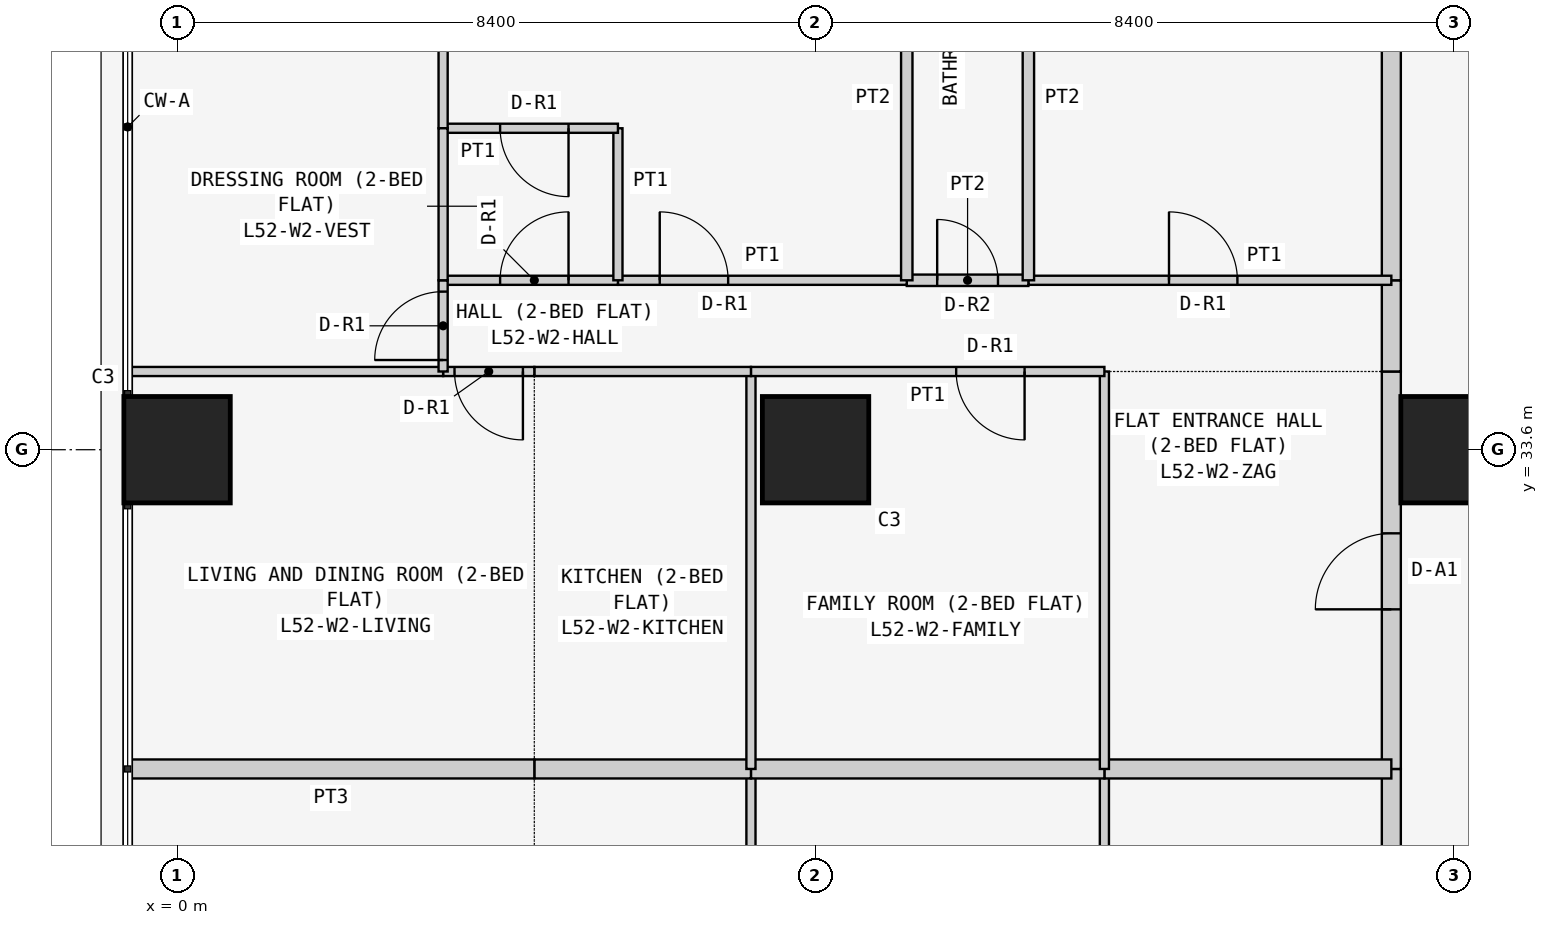
"""IFC4 building model, lengths in metres.
Left out: names, types, materials, properties, quantities, classifications, styles, units other than length and angle.
Written with IfcOpenShell. Run it as: python <this file> out.ifc"""

import sys

from ifc_helpers import new_model, si_unit, direction, frame, frame_2d, origin, origin_2d, place, context, subcontext, project, spatial, rectangle, extrude, element, fill, save


model = new_model("IFC4")
c1 = context("Model", 3, precision=1e-05, world=origin(), true_north=direction((0.0, 1.0)))
c2 = subcontext(c1, "Body", "Model", "MODEL_VIEW")
j1 = project(units=[si_unit("LENGTHUNIT", "METRE"), si_unit("PLANEANGLEUNIT", "RADIAN")], contexts=[c1])
p1 = place(None, origin())
s1 = spatial("IfcSite", under=j1, at=p1, CompositionType="ELEMENT")
p2 = place(p1, origin())
s2 = spatial("IfcBuilding", under=s1, at=p2, CompositionType="ELEMENT")
p3 = place(p2, frame((0.0, 0.0, 201.3)))
s3 = spatial("IfcBuildingStorey", under=s2, at=p3, CompositionType="ELEMENT", Elevation=201.3)
for number, where, z_axis, x_axis in (
    (1, (0.0, 33.6, 0.0), (0.0, 0.0, 1.0), (1.0, 0.0, 0.0)),
    (2, (8.4, 33.6, 0.0), (0.0, 0.0, 1.0), (1.0, 0.0, 0.0)),
    (3, (16.8, 33.6, 0.0), (0.0, 0.0, 1.0), (1.0, 0.0, 0.0)),
):
    element("IfcColumn", number, at=place(p3, frame(where, z_axis=z_axis, x_axis=x_axis)), inside=s3, PredefinedType="COLUMN", context=c2, shape_type="SweptSolid", body=[
        extrude(rectangle(XDim=1.4, YDim=1.4, at=origin_2d()), origin(), (0.0, 0.0, 1.0), 3.6),
    ])
p4 = place(p3, frame((15.975, 24.171, 0.0), z_axis=(0.0, 0.0, 1.0), x_axis=(0.0, 1.0, 0.0)))
e4 = element("IfcWall", 4, at=p4, inside=s3, PredefinedType="PARTITIONING", context=c2, shape_type="SweptSolid", body=[
    extrude(rectangle(XDim=5.229, YDim=0.25, at=frame_2d((2.615, 0.0))), origin(), (0.0, 0.0, 1.0), 3.45),
])
p5 = place(p4, frame((2.129, 0.0, 0.0)))
e5 = element("IfcOpeningElement", 5, at=p5, cuts=e4, PredefinedType="OPENING", context=c2, shape_type="SweptSolid", body=[
    extrude(rectangle(XDim=1.0, YDim=2.1, at=frame_2d((0.5, 1.05))), frame((0.0, 0.135, 0.0), z_axis=(0.0, -1.0, 0.0), x_axis=(1.0, 0.0, 0.0)), (0.0, 0.0, 1.0), 0.27),
])
p6 = place(p3, frame((15.975, 29.4, 0.0), z_axis=(0.0, 0.0, 1.0), x_axis=(0.0, 1.0, 0.0)))
e6 = element("IfcWall", 6, at=p6, inside=s3, PredefinedType="PARTITIONING", context=c2, shape_type="SweptSolid", body=[
    extrude(rectangle(XDim=5.229, YDim=0.25, at=frame_2d((2.615, 0.0))), origin(), (0.0, 0.0, 1.0), 3.45),
])
p7 = place(p6, frame((2.1, 0.0, 0.0)))
e7 = element("IfcOpeningElement", 7, at=p7, cuts=e6, PredefinedType="OPENING", context=c2, shape_type="SweptSolid", body=[
    extrude(rectangle(XDim=1.0, YDim=2.1, at=frame_2d((0.5, 1.05))), frame((0.0, 0.135, 0.0), z_axis=(0.0, -1.0, 0.0), x_axis=(1.0, 0.0, 0.0)), (0.0, 0.0, 1.0), 0.27),
])
p8 = place(p3, frame((15.975, 34.629, 0.0), z_axis=(0.0, 0.0, 1.0), x_axis=(0.0, 1.0, 0.0)))
e8 = element("IfcWall", 8, at=p8, inside=s3, PredefinedType="PARTITIONING", context=c2, shape_type="SweptSolid", body=[
    extrude(rectangle(XDim=1.2, YDim=0.25, at=frame_2d((0.6, 0.0))), origin(), (0.0, 0.0, 1.0), 3.45),
])
p9 = place(p3, frame((15.975, 35.829, 0.0), z_axis=(0.0, 0.0, 1.0), x_axis=(0.0, 1.0, 0.0)))
e9 = element("IfcWall", 9, at=p9, inside=s3, PredefinedType="PARTITIONING", context=c2, shape_type="SweptSolid", body=[
    extrude(rectangle(XDim=6.871, YDim=0.25, at=frame_2d((3.436, 0.0))), origin(), (0.0, 0.0, 1.0), 3.45),
])
p10 = place(p3, frame((12.2, 29.4, 0.0), z_axis=(0.0, 0.0, 1.0), x_axis=(0.0, -1.0, 0.0)))
e10 = element("IfcWall", 10, at=p10, inside=s3, PredefinedType="PARTITIONING", context=c2, shape_type="SweptSolid", body=[
    extrude(rectangle(XDim=5.229, YDim=0.12, at=frame_2d((2.615, 0.0))), origin(), (0.0, 0.0, 1.0), 3.45),
])
p11 = place(p3, frame((15.975, 29.4, 0.0), z_axis=(0.0, 0.0, 1.0), x_axis=(-1.0, 0.0, 0.0)))
e11 = element("IfcWall", 11, at=p11, inside=s3, PredefinedType="PARTITIONING", context=c2, shape_type="SweptSolid", body=[
    extrude(rectangle(XDim=3.775, YDim=0.25, at=frame_2d((1.888, 0.0))), origin(), (0.0, 0.0, 1.0), 3.45),
])
p12 = place(p3, frame((7.55, 29.4, 0.0), z_axis=(0.0, 0.0, 1.0), x_axis=(0.0, -1.0, 0.0)))
e12 = element("IfcWall", 12, at=p12, inside=s3, PredefinedType="PARTITIONING", context=c2, shape_type="SweptSolid", body=[
    extrude(rectangle(XDim=5.229, YDim=0.12, at=frame_2d((2.615, 0.0))), origin(), (0.0, 0.0, 1.0), 3.45),
])
p13 = place(p3, frame((12.2, 29.4, 0.0), z_axis=(0.0, 0.0, 1.0), x_axis=(-1.0, 0.0, 0.0)))
e13 = element("IfcWall", 13, at=p13, inside=s3, PredefinedType="PARTITIONING", context=c2, shape_type="SweptSolid", body=[
    extrude(rectangle(XDim=4.65, YDim=0.25, at=frame_2d((2.325, 0.0))), origin(), (0.0, 0.0, 1.0), 3.45),
])
p14 = place(p3, frame((7.55, 29.4, 0.0), z_axis=(0.0, 0.0, 1.0), x_axis=(-1.0, 0.0, 0.0)))
e14 = element("IfcWall", 14, at=p14, inside=s3, PredefinedType="PARTITIONING", context=c2, shape_type="SweptSolid", body=[
    extrude(rectangle(XDim=2.85, YDim=0.25, at=frame_2d((1.425, 0.0))), origin(), (0.0, 0.0, 1.0), 3.45),
])
p15 = place(p3, frame((4.7, 29.4, 0.0), z_axis=(0.0, 0.0, 1.0), x_axis=(-1.0, 0.0, 0.0)))
e15 = element("IfcWall", 15, at=p15, inside=s3, PredefinedType="PARTITIONING", context=c2, shape_type="SweptSolid", body=[
    extrude(rectangle(XDim=5.35, YDim=0.25, at=frame_2d((2.675, 0.0))), origin(), (0.0, 0.0, 1.0), 3.45),
])
for number, where, z_axis, x_axis in (
    (16, (12.2, 29.4, 0.0), (0.0, 0.0, 1.0), (0.0, 1.0, 0.0)),
    (17, (7.55, 29.4, 0.0), (0.0, 0.0, 1.0), (0.0, 1.0, 0.0)),
):
    element("IfcWall", number, at=place(p3, frame(where, z_axis=z_axis, x_axis=x_axis)), inside=s3, PredefinedType="PARTITIONING", context=c2, shape_type="SweptSolid", body=[
        extrude(rectangle(XDim=5.229, YDim=0.12, at=frame_2d((2.615, 0.0))), origin(), (0.0, 0.0, 1.0), 3.45),
    ])
p16 = place(p3, frame((7.55, 34.629, 0.0), z_axis=(0.0, 0.0, 1.0), x_axis=(1.0, 0.0, 0.0)))
e18 = element("IfcWall", 18, at=p16, inside=s3, PredefinedType="PARTITIONING", context=c2, shape_type="SweptSolid", body=[
    extrude(rectangle(XDim=4.65, YDim=0.12, at=frame_2d((2.325, 0.0))), origin(), (0.0, 0.0, 1.0), 3.45),
])
p17 = place(p16, frame((2.7, 0.0, 0.0)))
e19 = element("IfcOpeningElement", 19, at=p17, cuts=e18, PredefinedType="OPENING", context=c2, shape_type="SweptSolid", body=[
    extrude(rectangle(XDim=0.9, YDim=2.1, at=frame_2d((0.45, 1.05))), frame((0.0, 0.07, 0.0), z_axis=(0.0, -1.0, 0.0), x_axis=(1.0, 0.0, 0.0)), (0.0, 0.0, 1.0), 0.14),
])
p18 = place(p3, frame((4.7, 34.629, 0.0), z_axis=(0.0, 0.0, 1.0), x_axis=(1.0, 0.0, 0.0)))
e20 = element("IfcWall", 20, at=p18, inside=s3, PredefinedType="PARTITIONING", context=c2, shape_type="SweptSolid", body=[
    extrude(rectangle(XDim=2.85, YDim=0.12, at=frame_2d((1.425, 0.0))), origin(), (0.0, 0.0, 1.0), 3.45),
])
p19 = place(p3, frame((3.5, 34.629, 0.0), z_axis=(0.0, 0.0, 1.0), x_axis=(1.0, 0.0, 0.0)))
e21 = element("IfcWall", 21, at=p19, inside=s3, PredefinedType="PARTITIONING", context=c2, shape_type="SweptSolid", body=[
    extrude(rectangle(XDim=1.2, YDim=0.12, at=frame_2d((0.6, 0.0))), origin(), (0.0, 0.0, 1.0), 3.45),
])
p20 = place(p19, frame((0.15, 0.0, 0.0)))
e22 = element("IfcOpeningElement", 22, at=p20, cuts=e21, PredefinedType="OPENING", context=c2, shape_type="SweptSolid", body=[
    extrude(rectangle(XDim=0.9, YDim=2.1, at=frame_2d((0.45, 1.05))), frame((0.0, 0.07, 0.0), z_axis=(0.0, -1.0, 0.0), x_axis=(1.0, 0.0, 0.0)), (0.0, 0.0, 1.0), 0.14),
])
p21 = place(p3, frame((-0.65, 34.629, 0.0), z_axis=(0.0, 0.0, 1.0), x_axis=(1.0, 0.0, 0.0)))
e23 = element("IfcWall", 23, at=p21, inside=s3, PredefinedType="PARTITIONING", context=c2, shape_type="SweptSolid", body=[
    extrude(rectangle(XDim=4.15, YDim=0.12, at=frame_2d((2.075, 0.0))), origin(), (0.0, 0.0, 1.0), 3.45),
])
p22 = place(p3, frame((11.2, 35.829, 0.0), z_axis=(0.0, 0.0, 1.0), x_axis=(1.0, 0.0, 0.0)))
e24 = element("IfcWall", 24, at=p22, inside=s3, PredefinedType="PARTITIONING", context=c2, shape_type="SweptSolid", body=[
    extrude(rectangle(XDim=4.775, YDim=0.12, at=frame_2d((2.388, 0.0))), origin(), (0.0, 0.0, 1.0), 3.45),
])
p23 = place(p22, frame((1.85, 0.0, 0.0)))
e25 = element("IfcOpeningElement", 25, at=p23, cuts=e24, PredefinedType="OPENING", context=c2, shape_type="SweptSolid", body=[
    extrude(rectangle(XDim=0.9, YDim=2.1, at=frame_2d((0.45, 1.05))), frame((0.0, 0.07, 0.0), z_axis=(0.0, -1.0, 0.0), x_axis=(1.0, 0.0, 0.0)), (0.0, 0.0, 1.0), 0.14),
])
p24 = place(p3, frame((9.6, 35.829, 0.0), z_axis=(0.0, 0.0, 1.0), x_axis=(1.0, 0.0, 0.0)))
e26 = element("IfcWall", 26, at=p24, inside=s3, PredefinedType="PARTITIONING", context=c2, shape_type="SweptSolid", body=[
    extrude(rectangle(XDim=1.6, YDim=0.15, at=frame_2d((0.8, 0.0))), origin(), (0.0, 0.0, 1.0), 3.45),
])
p25 = place(p24, frame((0.4, 0.0, 0.0)))
e27 = element("IfcOpeningElement", 27, at=p25, cuts=e26, PredefinedType="OPENING", context=c2, shape_type="SweptSolid", body=[
    extrude(rectangle(XDim=0.8, YDim=2.1, at=frame_2d((0.4, 1.05))), frame((0.0, 0.085, 0.0), z_axis=(0.0, -1.0, 0.0), x_axis=(1.0, 0.0, 0.0)), (0.0, 0.0, 1.0), 0.17),
])
p26 = place(p3, frame((5.8, 35.829, 0.0), z_axis=(0.0, 0.0, 1.0), x_axis=(1.0, 0.0, 0.0)))
e28 = element("IfcWall", 28, at=p26, inside=s3, PredefinedType="PARTITIONING", context=c2, shape_type="SweptSolid", body=[
    extrude(rectangle(XDim=3.8, YDim=0.12, at=frame_2d((1.9, 0.0))), origin(), (0.0, 0.0, 1.0), 3.45),
])
p27 = place(p26, frame((0.55, 0.0, 0.0)))
e29 = element("IfcOpeningElement", 29, at=p27, cuts=e28, PredefinedType="OPENING", context=c2, shape_type="SweptSolid", body=[
    extrude(rectangle(XDim=0.9, YDim=2.1, at=frame_2d((0.45, 1.05))), frame((0.0, 0.07, 0.0), z_axis=(0.0, -1.0, 0.0), x_axis=(1.0, 0.0, 0.0)), (0.0, 0.0, 1.0), 0.14),
])
p28 = place(p3, frame((3.5, 35.829, 0.0), z_axis=(0.0, 0.0, 1.0), x_axis=(1.0, 0.0, 0.0)))
e30 = element("IfcWall", 30, at=p28, inside=s3, PredefinedType="PARTITIONING", context=c2, shape_type="SweptSolid", body=[
    extrude(rectangle(XDim=2.3, YDim=0.12, at=frame_2d((1.15, 0.0))), origin(), (0.0, 0.0, 1.0), 3.45),
])
p29 = place(p28, frame((0.75, 0.0, 0.0)))
e31 = element("IfcOpeningElement", 31, at=p29, cuts=e30, PredefinedType="OPENING", context=c2, shape_type="SweptSolid", body=[
    extrude(rectangle(XDim=0.9, YDim=2.1, at=frame_2d((0.45, 1.05))), frame((0.0, 0.07, 0.0), z_axis=(0.0, -1.0, 0.0), x_axis=(1.0, 0.0, 0.0)), (0.0, 0.0, 1.0), 0.14),
])
p30 = place(p3, frame((3.5, 34.629, 0.0), z_axis=(0.0, 0.0, 1.0), x_axis=(0.0, 1.0, 0.0)))
e32 = element("IfcWall", 32, at=p30, inside=s3, PredefinedType="PARTITIONING", context=c2, shape_type="SweptSolid", body=[
    extrude(rectangle(XDim=1.2, YDim=0.12, at=frame_2d((0.6, 0.0))), origin(), (0.0, 0.0, 1.0), 3.45),
])
p31 = place(p30, frame((0.151, 0.0, 0.0)))
e33 = element("IfcOpeningElement", 33, at=p31, cuts=e32, PredefinedType="OPENING", context=c2, shape_type="SweptSolid", body=[
    extrude(rectangle(XDim=0.9, YDim=2.1, at=frame_2d((0.45, 1.05))), frame((0.0, 0.07, 0.0), z_axis=(0.0, -1.0, 0.0), x_axis=(1.0, 0.0, 0.0)), (0.0, 0.0, 1.0), 0.14),
])
for number, where, z_axis, x_axis in (
    (34, (11.2, 35.829, 0.0), (0.0, 0.0, 1.0), (0.0, 1.0, 0.0)),
    (35, (9.6, 35.829, 0.0), (0.0, 0.0, 1.0), (0.0, 1.0, 0.0)),
):
    element("IfcWall", number, at=place(p3, frame(where, z_axis=z_axis, x_axis=x_axis)), inside=s3, PredefinedType="PARTITIONING", context=c2, shape_type="SweptSolid", body=[
        extrude(rectangle(XDim=6.871, YDim=0.15, at=frame_2d((3.436, 0.0))), origin(), (0.0, 0.0, 1.0), 3.45),
    ])
p32 = place(p3, frame((5.8, 35.829, 0.0), z_axis=(0.0, 0.0, 1.0), x_axis=(0.0, 1.0, 0.0)))
e36 = element("IfcWall", 36, at=p32, inside=s3, PredefinedType="PARTITIONING", context=c2, shape_type="SweptSolid", body=[
    extrude(rectangle(XDim=2.0, YDim=0.12, at=frame_2d((1.0, 0.0))), origin(), (0.0, 0.0, 1.0), 3.45),
])
p33 = place(p3, frame((5.8, 37.829, 0.0), z_axis=(0.0, 0.0, 1.0), x_axis=(-1.0, 0.0, 0.0)))
e37 = element("IfcWall", 37, at=p33, inside=s3, PredefinedType="PARTITIONING", context=c2, shape_type="SweptSolid", body=[
    extrude(rectangle(XDim=2.3, YDim=0.12, at=frame_2d((1.15, 0.0))), origin(), (0.0, 0.0, 1.0), 3.45),
])
p34 = place(p33, frame((0.65, 0.0, 0.0)))
e38 = element("IfcOpeningElement", 38, at=p34, cuts=e37, PredefinedType="OPENING", context=c2, shape_type="SweptSolid", body=[
    extrude(rectangle(XDim=0.9, YDim=2.1, at=frame_2d((0.45, 1.05))), frame((0.0, 0.07, 0.0), z_axis=(0.0, -1.0, 0.0), x_axis=(1.0, 0.0, 0.0)), (0.0, 0.0, 1.0), 0.14),
])
p35 = place(p3, frame((3.5, 37.829, 0.0), z_axis=(0.0, 0.0, 1.0), x_axis=(0.0, 1.0, 0.0)))
e39 = element("IfcWall", 39, at=p35, inside=s3, PredefinedType="PARTITIONING", context=c2, shape_type="SweptSolid", body=[
    extrude(rectangle(XDim=4.871, YDim=0.12, at=frame_2d((2.436, 0.0))), origin(), (0.0, 0.0, 1.0), 3.45),
])
p36 = place(p3, frame((3.5, 35.829, 0.0), z_axis=(0.0, 0.0, 1.0), x_axis=(0.0, 1.0, 0.0)))
e40 = element("IfcWall", 40, at=p36, inside=s3, PredefinedType="PARTITIONING", context=c2, shape_type="SweptSolid", body=[
    extrude(rectangle(XDim=2.0, YDim=0.12, at=frame_2d((1.0, 0.0))), origin(), (0.0, 0.0, 1.0), 3.45),
])
p37 = place(p7, origin())
e41 = element("IfcDoor", 41, at=p37, inside=s3, OperationType="SINGLE_SWING_LEFT", PredefinedType="DOOR", context=c2, shape_type="SweptSolid", body=[
    extrude(rectangle(XDim=1.0, YDim=2.1, at=frame_2d((0.5, 1.05))), frame((0.0, 0.025, 0.0), z_axis=(0.0, -1.0, 0.0), x_axis=(1.0, 0.0, 0.0)), (0.0, 0.0, 1.0), 0.05),
])
fill(e7, e41)
p38 = place(p17, frame((0.9, 0.0, 0.0), z_axis=(0.0, 0.0, 1.0), x_axis=(-1.0, 0.0, 0.0)))
e42 = element("IfcDoor", 42, at=p38, inside=s3, OperationType="SINGLE_SWING_LEFT", PredefinedType="DOOR", context=c2, shape_type="SweptSolid", body=[
    extrude(rectangle(XDim=0.9, YDim=2.1, at=frame_2d((0.45, 1.05))), frame((0.0, 0.025, 0.0), z_axis=(0.0, -1.0, 0.0), x_axis=(1.0, 0.0, 0.0)), (0.0, 0.0, 1.0), 0.05),
])
fill(e19, e42)
p39 = place(p20, frame((0.9, 0.0, 0.0), z_axis=(0.0, 0.0, 1.0), x_axis=(-1.0, 0.0, 0.0)))
e43 = element("IfcDoor", 43, at=p39, inside=s3, OperationType="SINGLE_SWING_LEFT", PredefinedType="DOOR", context=c2, shape_type="SweptSolid", body=[
    extrude(rectangle(XDim=0.9, YDim=2.1, at=frame_2d((0.45, 1.05))), frame((0.0, 0.025, 0.0), z_axis=(0.0, -1.0, 0.0), x_axis=(1.0, 0.0, 0.0)), (0.0, 0.0, 1.0), 0.05),
])
fill(e22, e43)
p40 = place(p23, origin())
e44 = element("IfcDoor", 44, at=p40, inside=s3, OperationType="SINGLE_SWING_LEFT", PredefinedType="DOOR", context=c2, shape_type="SweptSolid", body=[
    extrude(rectangle(XDim=0.9, YDim=2.1, at=frame_2d((0.45, 1.05))), frame((0.0, 0.025, 0.0), z_axis=(0.0, -1.0, 0.0), x_axis=(1.0, 0.0, 0.0)), (0.0, 0.0, 1.0), 0.05),
])
fill(e25, e44)
p41 = place(p25, origin())
e45 = element("IfcDoor", 45, at=p41, inside=s3, OperationType="SINGLE_SWING_LEFT", PredefinedType="DOOR", context=c2, shape_type="SweptSolid", body=[
    extrude(rectangle(XDim=0.8, YDim=2.1, at=frame_2d((0.4, 1.05))), frame((0.0, 0.025, 0.0), z_axis=(0.0, -1.0, 0.0), x_axis=(1.0, 0.0, 0.0)), (0.0, 0.0, 1.0), 0.05),
])
fill(e27, e45)
p42 = place(p27, origin())
e46 = element("IfcDoor", 46, at=p42, inside=s3, OperationType="SINGLE_SWING_LEFT", PredefinedType="DOOR", context=c2, shape_type="SweptSolid", body=[
    extrude(rectangle(XDim=0.9, YDim=2.1, at=frame_2d((0.45, 1.05))), frame((0.0, 0.025, 0.0), z_axis=(0.0, -1.0, 0.0), x_axis=(1.0, 0.0, 0.0)), (0.0, 0.0, 1.0), 0.05),
])
fill(e29, e46)
p43 = place(p29, origin())
e47 = element("IfcDoor", 47, at=p43, inside=s3, OperationType="SINGLE_SWING_RIGHT", PredefinedType="DOOR", context=c2, shape_type="SweptSolid", body=[
    extrude(rectangle(XDim=0.9, YDim=2.1, at=frame_2d((0.45, 1.05))), frame((0.0, 0.025, 0.0), z_axis=(0.0, -1.0, 0.0), x_axis=(1.0, 0.0, 0.0)), (0.0, 0.0, 1.0), 0.05),
])
fill(e31, e47)
p44 = place(p34, origin())
e48 = element("IfcDoor", 48, at=p44, inside=s3, OperationType="SINGLE_SWING_LEFT", PredefinedType="DOOR", context=c2, shape_type="SweptSolid", body=[
    extrude(rectangle(XDim=0.9, YDim=2.1, at=frame_2d((0.45, 1.05))), frame((0.0, 0.025, 0.0), z_axis=(0.0, -1.0, 0.0), x_axis=(1.0, 0.0, 0.0)), (0.0, 0.0, 1.0), 0.05),
])
fill(e38, e48)
p45 = place(p31, origin())
e49 = element("IfcDoor", 49, at=p45, inside=s3, OperationType="SINGLE_SWING_LEFT", PredefinedType="DOOR", context=c2, shape_type="SweptSolid", body=[
    extrude(rectangle(XDim=0.9, YDim=2.1, at=frame_2d((0.45, 1.05))), frame((0.0, 0.025, 0.0), z_axis=(0.0, -1.0, 0.0), x_axis=(1.0, 0.0, 0.0)), (0.0, 0.0, 1.0), 0.05),
])
fill(e33, e49)
save(model, sys.argv[1])
